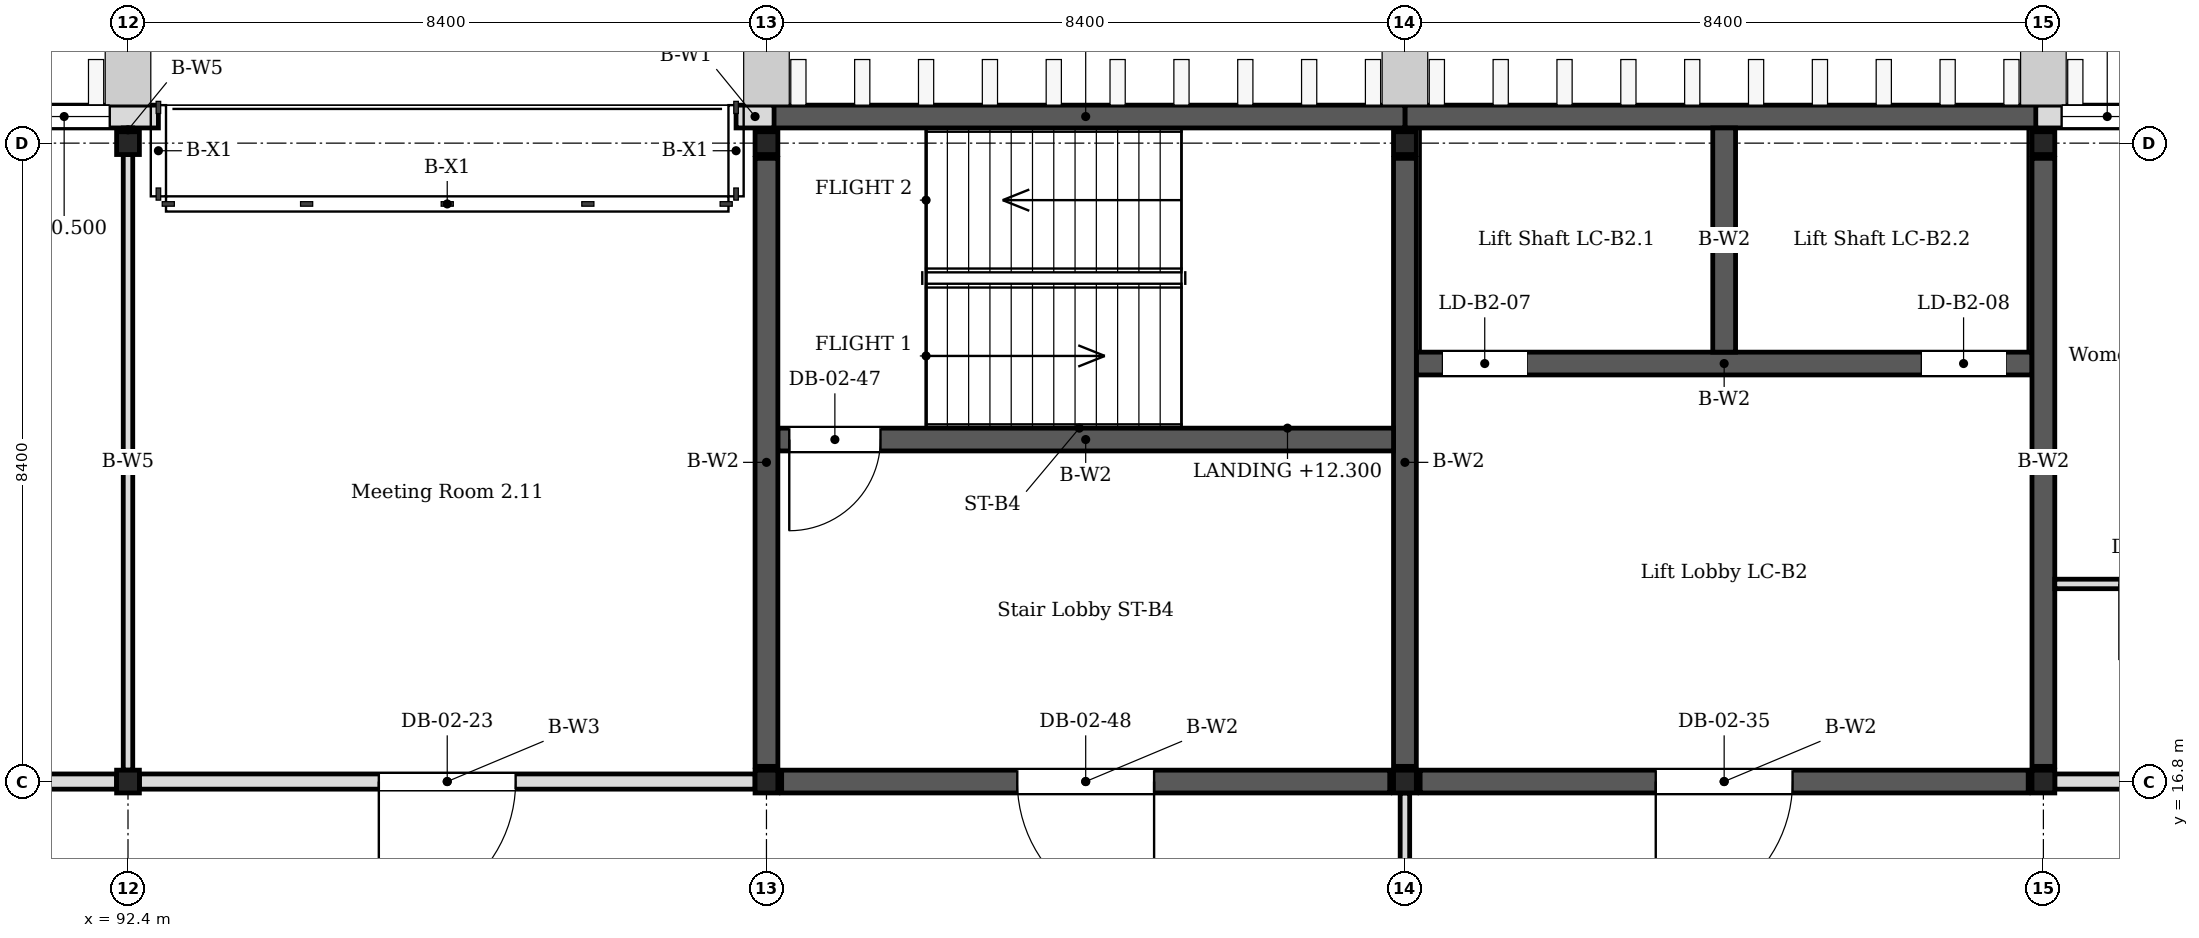
"""IFC4 building model, lengths in metres.
Left out: names, types, materials, properties, quantities, classifications, styles, units other than length and angle.
Written with IfcOpenShell. Run it as: python <this file> out.ifc"""

import sys

from ifc_helpers import new_model, si_unit, direction, frame, frame_2d, origin, origin_2d, place, context, subcontext, project, spatial, rectangle, i_section, extrude, element, fill, save


model = new_model("IFC4")
c1 = context("Model", 3, precision=1e-05, world=origin(), true_north=direction((0.0, 1.0)))
c2 = subcontext(c1, "Body", "Model", "MODEL_VIEW")
j1 = project(units=[si_unit("LENGTHUNIT", "METRE"), si_unit("PLANEANGLEUNIT", "RADIAN")], contexts=[c1])
p1 = place(None, origin())
s1 = spatial("IfcSite", under=j1, at=p1, CompositionType="ELEMENT")
p2 = place(p1, origin())
s2 = spatial("IfcBuilding", under=s1, at=p2, CompositionType="ELEMENT")
p3 = place(p2, frame((0.0, 0.0, 10.2)))
s3 = spatial("IfcBuildingStorey", under=s2, at=p3, CompositionType="ELEMENT", Elevation=10.2)
for number, where, z_axis, x_axis in (
    (1, (92.4, 16.8, 0.0), (0.0, 0.0, 1.0), (1.0, 0.0, 0.0)),
    (2, (92.4, 25.2, 0.0), (0.0, 0.0, 1.0), (1.0, 0.0, 0.0)),
    (3, (100.8, 16.8, 0.0), (0.0, 0.0, 1.0), (1.0, 0.0, 0.0)),
    (4, (100.8, 25.2, 0.0), (0.0, 0.0, 1.0), (1.0, 0.0, 0.0)),
    (5, (109.2, 16.8, 0.0), (0.0, 0.0, 1.0), (1.0, 0.0, 0.0)),
    (6, (109.2, 25.2, 0.0), (0.0, 0.0, 1.0), (1.0, 0.0, 0.0)),
    (7, (117.6, 16.8, 0.0), (0.0, 0.0, 1.0), (1.0, 0.0, 0.0)),
    (8, (117.6, 25.2, 0.0), (0.0, 0.0, 1.0), (1.0, 0.0, 0.0)),
):
    element("IfcColumn", number, at=place(p3, frame(where, z_axis=z_axis, x_axis=x_axis)), inside=s3, PredefinedType="COLUMN", context=c2, shape_type="SweptSolid", body=[
        extrude(i_section(OverallWidth=0.3, OverallDepth=0.3, WebThickness=0.01, FlangeThickness=0.015, FilletRadius=0.013, at=origin_2d()), origin(), (0.0, 0.0, 1.0), 4.2),
    ])
for number, where, z_axis, x_axis in (
    (9, (109.2, 17.0, 0.0), (0.0, 0.0, 1.0), (0.0, 1.0, 0.0)),
    (10, (117.6, 17.0, 0.0), (0.0, 0.0, 1.0), (0.0, 1.0, 0.0)),
):
    element("IfcWall", number, at=place(p3, frame(where, z_axis=z_axis, x_axis=x_axis)), inside=s3, PredefinedType="SHEAR", context=c2, shape_type="SweptSolid", body=[
        extrude(rectangle(XDim=8.0, YDim=0.3, at=frame_2d((4.0, 0.0))), origin(), (0.0, 0.0, 1.0), 4.05),
    ])
p4 = place(p3, frame((109.4, 16.8, 0.0), z_axis=(0.0, 0.0, 1.0), x_axis=(1.0, 0.0, 0.0)))
e11 = element("IfcWall", 11, at=p4, inside=s3, PredefinedType="SHEAR", context=c2, shape_type="SweptSolid", body=[
    extrude(rectangle(XDim=8.0, YDim=0.3, at=frame_2d((4.0, 0.0))), origin(), (0.0, 0.0, 1.0), 4.05),
])
p5 = place(p4, frame((3.1, 0.0, 0.0)))
e12 = element("IfcOpeningElement", 12, at=p5, cuts=e11, PredefinedType="OPENING", context=c2, shape_type="SweptSolid", body=[
    extrude(rectangle(XDim=1.8, YDim=2.1, at=frame_2d((0.9, 1.05))), frame((0.0, 0.16, 0.0), z_axis=(0.0, -1.0, 0.0), x_axis=(1.0, 0.0, 0.0)), (0.0, 0.0, 1.0), 0.32),
])
p6 = place(p3, frame((109.35, 22.3, 0.0), z_axis=(0.0, 0.0, 1.0), x_axis=(1.0, 0.0, 0.0)))
e13 = element("IfcWall", 13, at=p6, inside=s3, PredefinedType="SHEAR", context=c2, shape_type="SweptSolid", body=[
    extrude(rectangle(XDim=8.1, YDim=0.3, at=frame_2d((4.05, 0.0))), origin(), (0.0, 0.0, 1.0), 4.05),
])
p7 = place(p6, frame((0.35, 0.0, 0.0)))
e14 = element("IfcOpeningElement", 14, at=p7, cuts=e13, PredefinedType="OPENING", context=c2, shape_type="SweptSolid", body=[
    extrude(rectangle(XDim=1.1, YDim=2.2, at=frame_2d((0.55, 1.1))), frame((0.0, 0.16, 0.0), z_axis=(0.0, -1.0, 0.0), x_axis=(1.0, 0.0, 0.0)), (0.0, 0.0, 1.0), 0.32),
])
p8 = place(p6, frame((6.65, 0.0, 0.0)))
e15 = element("IfcOpeningElement", 15, at=p8, cuts=e13, PredefinedType="OPENING", context=c2, shape_type="SweptSolid", body=[
    extrude(rectangle(XDim=1.1, YDim=2.2, at=frame_2d((0.55, 1.1))), frame((0.0, 0.16, 0.0), z_axis=(0.0, -1.0, 0.0), x_axis=(1.0, 0.0, 0.0)), (0.0, 0.0, 1.0), 0.32),
])
p9 = place(p3, frame((109.2, 25.55, 0.0), z_axis=(0.0, 0.0, 1.0), x_axis=(1.0, 0.0, 0.0)))
e16 = element("IfcWall", 16, at=p9, inside=s3, PredefinedType="SHEAR", context=c2, shape_type="SweptSolid", body=[
    extrude(rectangle(XDim=8.4, YDim=0.3, at=frame_2d((4.2, 0.0))), origin(), (0.0, 0.0, 1.0), 4.05),
])
p10 = place(p3, frame((113.4, 22.45, 0.0), z_axis=(0.0, 0.0, 1.0), x_axis=(0.0, 1.0, 0.0)))
e17 = element("IfcWall", 17, at=p10, inside=s3, PredefinedType="SHEAR", context=c2, shape_type="SweptSolid", body=[
    extrude(rectangle(XDim=2.95, YDim=0.3, at=frame_2d((1.475, 0.0))), origin(), (0.0, 0.0, 1.0), 4.05),
])
p11 = place(p3, frame((100.8, 17.0, 0.0), z_axis=(0.0, 0.0, 1.0), x_axis=(0.0, 1.0, 0.0)))
e18 = element("IfcWall", 18, at=p11, inside=s3, PredefinedType="SHEAR", context=c2, shape_type="SweptSolid", body=[
    extrude(rectangle(XDim=8.0, YDim=0.3, at=frame_2d((4.0, 0.0))), origin(), (0.0, 0.0, 1.0), 4.05),
])
p12 = place(p3, frame((101.0, 16.8, 0.0), z_axis=(0.0, 0.0, 1.0), x_axis=(1.0, 0.0, 0.0)))
e19 = element("IfcWall", 19, at=p12, inside=s3, PredefinedType="SHEAR", context=c2, shape_type="SweptSolid", body=[
    extrude(rectangle(XDim=8.0, YDim=0.3, at=frame_2d((4.0, 0.0))), origin(), (0.0, 0.0, 1.0), 4.05),
])
p13 = place(p12, frame((3.1, 0.0, 0.0)))
e20 = element("IfcOpeningElement", 20, at=p13, cuts=e19, PredefinedType="OPENING", context=c2, shape_type="SweptSolid", body=[
    extrude(rectangle(XDim=1.8, YDim=2.1, at=frame_2d((0.9, 1.05))), frame((0.0, 0.16, 0.0), z_axis=(0.0, -1.0, 0.0), x_axis=(1.0, 0.0, 0.0)), (0.0, 0.0, 1.0), 0.32),
])
p14 = place(p3, frame((100.95, 21.3, 0.0), z_axis=(0.0, 0.0, 1.0), x_axis=(1.0, 0.0, 0.0)))
e21 = element("IfcWall", 21, at=p14, inside=s3, PredefinedType="SHEAR", context=c2, shape_type="SweptSolid", body=[
    extrude(rectangle(XDim=8.1, YDim=0.3, at=frame_2d((4.05, 0.0))), origin(), (0.0, 0.0, 1.0), 4.05),
])
p15 = place(p14, frame((0.15, 0.0, 0.0)))
e22 = element("IfcOpeningElement", 22, at=p15, cuts=e21, PredefinedType="OPENING", context=c2, shape_type="SweptSolid", body=[
    extrude(rectangle(XDim=1.2, YDim=2.1, at=frame_2d((0.6, 1.05))), frame((0.0, 0.16, 0.0), z_axis=(0.0, -1.0, 0.0), x_axis=(1.0, 0.0, 0.0)), (0.0, 0.0, 1.0), 0.32),
])
p16 = place(p3, frame((100.8, 25.55, 0.0), z_axis=(0.0, 0.0, 1.0), x_axis=(1.0, 0.0, 0.0)))
e23 = element("IfcWall", 23, at=p16, inside=s3, PredefinedType="SHEAR", context=c2, shape_type="SweptSolid", body=[
    extrude(rectangle(XDim=8.4, YDim=0.3, at=frame_2d((4.2, 0.0))), origin(), (0.0, 0.0, 1.0), 4.05),
])
p17 = place(p3, frame((83.6, 25.55, 0.0), z_axis=(0.0, 0.0, 1.0), x_axis=(1.0, 0.0, 0.0)))
e24 = element("IfcWall", 24, at=p17, inside=s3, PredefinedType="SOLIDWALL", context=c2, shape_type="SweptSolid", body=[
    extrude(rectangle(XDim=9.2, YDim=0.3, at=frame_2d((4.6, 0.0))), origin(), (0.0, 0.0, 1.0), 4.05),
])
p18 = place(p17, frame((0.64, 0.0, 0.3)))
e25 = element("IfcOpeningElement", 25, at=p18, cuts=e24, PredefinedType="OPENING", context=c2, shape_type="SweptSolid", body=[
    extrude(rectangle(XDim=1.2, YDim=3.3, at=frame_2d((0.6, 1.65))), frame((0.0, 0.16, 0.0), z_axis=(0.0, -1.0, 0.0), x_axis=(1.0, 0.0, 0.0)), (0.0, 0.0, 1.0), 0.32),
])
p19 = place(p17, frame((2.32, 0.0, 0.3)))
e26 = element("IfcOpeningElement", 26, at=p19, cuts=e24, PredefinedType="OPENING", context=c2, shape_type="SweptSolid", body=[
    extrude(rectangle(XDim=1.2, YDim=3.3, at=frame_2d((0.6, 1.65))), frame((0.0, 0.16, 0.0), z_axis=(0.0, -1.0, 0.0), x_axis=(1.0, 0.0, 0.0)), (0.0, 0.0, 1.0), 0.32),
])
p20 = place(p17, frame((4.0, 0.0, 0.3)))
e27 = element("IfcOpeningElement", 27, at=p20, cuts=e24, PredefinedType="OPENING", context=c2, shape_type="SweptSolid", body=[
    extrude(rectangle(XDim=1.2, YDim=3.3, at=frame_2d((0.6, 1.65))), frame((0.0, 0.16, 0.0), z_axis=(0.0, -1.0, 0.0), x_axis=(1.0, 0.0, 0.0)), (0.0, 0.0, 1.0), 0.32),
])
p21 = place(p17, frame((5.68, 0.0, 0.3)))
e28 = element("IfcOpeningElement", 28, at=p21, cuts=e24, PredefinedType="OPENING", context=c2, shape_type="SweptSolid", body=[
    extrude(rectangle(XDim=1.2, YDim=3.3, at=frame_2d((0.6, 1.65))), frame((0.0, 0.16, 0.0), z_axis=(0.0, -1.0, 0.0), x_axis=(1.0, 0.0, 0.0)), (0.0, 0.0, 1.0), 0.32),
])
p22 = place(p17, frame((7.36, 0.0, 0.3)))
e29 = element("IfcOpeningElement", 29, at=p22, cuts=e24, PredefinedType="OPENING", context=c2, shape_type="SweptSolid", body=[
    extrude(rectangle(XDim=1.2, YDim=3.3, at=frame_2d((0.6, 1.65))), frame((0.0, 0.16, 0.0), z_axis=(0.0, -1.0, 0.0), x_axis=(1.0, 0.0, 0.0)), (0.0, 0.0, 1.0), 0.32),
])
p23 = place(p3, frame((100.4, 25.55, 0.0), z_axis=(0.0, 0.0, 1.0), x_axis=(1.0, 0.0, 0.0)))
e30 = element("IfcWall", 30, at=p23, inside=s3, PredefinedType="SOLIDWALL", context=c2, shape_type="SweptSolid", body=[
    extrude(rectangle(XDim=0.5, YDim=0.3, at=frame_2d((0.25, 0.0))), origin(), (0.0, 0.0, 1.0), 4.05),
])
p24 = place(p3, frame((117.5, 25.55, 0.0), z_axis=(0.0, 0.0, 1.0), x_axis=(1.0, 0.0, 0.0)))
e31 = element("IfcWall", 31, at=p24, inside=s3, PredefinedType="SOLIDWALL", context=c2, shape_type="SweptSolid", body=[
    extrude(rectangle(XDim=8.9, YDim=0.3, at=frame_2d((4.45, 0.0))), origin(), (0.0, 0.0, 1.0), 4.05),
])
p25 = place(p24, frame((0.34, 0.0, 1.5)))
e32 = element("IfcOpeningElement", 32, at=p25, cuts=e31, PredefinedType="OPENING", context=c2, shape_type="SweptSolid", body=[
    extrude(rectangle(XDim=1.2, YDim=1.2, at=frame_2d((0.6, 0.6))), frame((0.0, 0.16, 0.0), z_axis=(0.0, -1.0, 0.0), x_axis=(1.0, 0.0, 0.0)), (0.0, 0.0, 1.0), 0.32),
])
p26 = place(p24, frame((3.7, 0.0, 1.5)))
e33 = element("IfcOpeningElement", 33, at=p26, cuts=e31, PredefinedType="OPENING", context=c2, shape_type="SweptSolid", body=[
    extrude(rectangle(XDim=1.2, YDim=1.2, at=frame_2d((0.6, 0.6))), frame((0.0, 0.16, 0.0), z_axis=(0.0, -1.0, 0.0), x_axis=(1.0, 0.0, 0.0)), (0.0, 0.0, 1.0), 0.32),
])
p27 = place(p24, frame((7.06, 0.0, 1.5)))
e34 = element("IfcOpeningElement", 34, at=p27, cuts=e31, PredefinedType="OPENING", context=c2, shape_type="SweptSolid", body=[
    extrude(rectangle(XDim=1.2, YDim=1.2, at=frame_2d((0.6, 0.6))), frame((0.0, 0.16, 0.0), z_axis=(0.0, -1.0, 0.0), x_axis=(1.0, 0.0, 0.0)), (0.0, 0.0, 1.0), 0.32),
])
p28 = place(p3, frame((84.15, 16.8, 0.0), z_axis=(0.0, 0.0, 1.0), x_axis=(1.0, 0.0, 0.0)))
e35 = element("IfcWall", 35, at=p28, inside=s3, PredefinedType="PARTITIONING", context=c2, shape_type="SweptSolid", body=[
    extrude(rectangle(XDim=8.1, YDim=0.2, at=frame_2d((4.05, 0.0))), origin(), (0.0, 0.0, 1.0), 3.35),
])
p29 = place(p28, frame((2.85, 0.0, 0.0)))
e36 = element("IfcOpeningElement", 36, at=p29, cuts=e35, PredefinedType="OPENING", context=c2, shape_type="SweptSolid", body=[
    extrude(rectangle(XDim=2.4, YDim=2.2, at=frame_2d((1.2, 1.1))), frame((0.0, 0.11, 0.0), z_axis=(0.0, -1.0, 0.0), x_axis=(1.0, 0.0, 0.0)), (0.0, 0.0, 1.0), 0.22),
])
p30 = place(p3, frame((92.55, 16.8, 0.0), z_axis=(0.0, 0.0, 1.0), x_axis=(1.0, 0.0, 0.0)))
e37 = element("IfcWall", 37, at=p30, inside=s3, PredefinedType="PARTITIONING", context=c2, shape_type="SweptSolid", body=[
    extrude(rectangle(XDim=8.1, YDim=0.2, at=frame_2d((4.05, 0.0))), origin(), (0.0, 0.0, 1.0), 3.35),
])
p31 = place(p30, frame((3.15, 0.0, 0.0)))
e38 = element("IfcOpeningElement", 38, at=p31, cuts=e37, PredefinedType="OPENING", context=c2, shape_type="SweptSolid", body=[
    extrude(rectangle(XDim=1.8, YDim=2.1, at=frame_2d((0.9, 1.05))), frame((0.0, 0.11, 0.0), z_axis=(0.0, -1.0, 0.0), x_axis=(1.0, 0.0, 0.0)), (0.0, 0.0, 1.0), 0.22),
])
p32 = place(p3, frame((117.75, 16.8, 0.0), z_axis=(0.0, 0.0, 1.0), x_axis=(1.0, 0.0, 0.0)))
e39 = element("IfcWall", 39, at=p32, inside=s3, PredefinedType="PARTITIONING", context=c2, shape_type="SweptSolid", body=[
    extrude(rectangle(XDim=8.1, YDim=0.2, at=frame_2d((4.05, 0.0))), origin(), (0.0, 0.0, 1.0), 3.35),
])
p33 = place(p32, frame((3.15, 0.0, 0.0)))
e40 = element("IfcOpeningElement", 40, at=p33, cuts=e39, PredefinedType="OPENING", context=c2, shape_type="SweptSolid", body=[
    extrude(rectangle(XDim=1.8, YDim=2.1, at=frame_2d((0.9, 1.05))), frame((0.0, 0.11, 0.0), z_axis=(0.0, -1.0, 0.0), x_axis=(1.0, 0.0, 0.0)), (0.0, 0.0, 1.0), 0.22),
])
p34 = place(p3, frame((117.75, 19.4, 0.0), z_axis=(0.0, 0.0, 1.0), x_axis=(1.0, 0.0, 0.0)))
e41 = element("IfcWall", 41, at=p34, inside=s3, PredefinedType="PARTITIONING", context=c2, shape_type="SweptSolid", body=[
    extrude(rectangle(XDim=8.175, YDim=0.125, at=frame_2d((4.087, 0.0))), origin(), (0.0, 0.0, 1.0), 3.35),
])
p35 = place(p34, frame((0.85, 0.0, 0.0)))
e42 = element("IfcOpeningElement", 42, at=p35, cuts=e41, PredefinedType="OPENING", context=c2, shape_type="SweptSolid", body=[
    extrude(rectangle(XDim=1.0, YDim=2.1, at=frame_2d((0.5, 1.05))), frame((0.0, 0.073, 0.0), z_axis=(0.0, -1.0, 0.0), x_axis=(1.0, 0.0, 0.0)), (0.0, 0.0, 1.0), 0.145),
])
p36 = place(p34, frame((3.85, 0.0, 0.0)))
e43 = element("IfcOpeningElement", 43, at=p36, cuts=e41, PredefinedType="OPENING", context=c2, shape_type="SweptSolid", body=[
    extrude(rectangle(XDim=1.0, YDim=2.1, at=frame_2d((0.5, 1.05))), frame((0.0, 0.073, 0.0), z_axis=(0.0, -1.0, 0.0), x_axis=(1.0, 0.0, 0.0)), (0.0, 0.0, 1.0), 0.145),
])
p37 = place(p34, frame((6.55, 0.0, 0.0)))
e44 = element("IfcOpeningElement", 44, at=p37, cuts=e41, PredefinedType="OPENING", context=c2, shape_type="SweptSolid", body=[
    extrude(rectangle(XDim=1.0, YDim=2.1, at=frame_2d((0.5, 1.05))), frame((0.0, 0.073, 0.0), z_axis=(0.0, -1.0, 0.0), x_axis=(1.0, 0.0, 0.0)), (0.0, 0.0, 1.0), 0.145),
])
p38 = place(p3, frame((92.4, 16.95, 0.0), z_axis=(0.0, 0.0, 1.0), x_axis=(0.0, 1.0, 0.0)))
e45 = element("IfcWall", 45, at=p38, inside=s3, PredefinedType="MOVABLE", context=c2, shape_type="SweptSolid", body=[
    extrude(rectangle(XDim=8.1, YDim=0.125, at=frame_2d((4.05, 0.0))), origin(), (0.0, 0.0, 1.0), 3.35),
])
p39 = place(p3, frame((92.4, 25.35, 0.0), z_axis=(0.0, 0.0, 1.0), x_axis=(0.0, 1.0, 0.0)))
e46 = element("IfcWall", 46, at=p39, inside=s3, PredefinedType="MOVABLE", context=c2, shape_type="SweptSolid", body=[
    extrude(rectangle(XDim=0.05, YDim=0.125, at=frame_2d((0.025, 0.0))), origin(), (0.0, 0.0, 1.0), 3.35),
])
p40 = place(p3, frame((109.2, 8.55, 0.0), z_axis=(0.0, 0.0, 1.0), x_axis=(0.0, 1.0, 0.0)))
e47 = element("IfcWall", 47, at=p40, inside=s3, PredefinedType="PARTITIONING", context=c2, shape_type="SweptSolid", body=[
    extrude(rectangle(XDim=8.1, YDim=0.125, at=frame_2d((4.05, 0.0))), origin(), (0.0, 0.0, 1.0), 3.35),
])
p41 = place(p40, frame((2.85, 0.0, 0.0)))
e48 = element("IfcOpeningElement", 48, at=p41, cuts=e47, PredefinedType="OPENING", context=c2, shape_type="SweptSolid", body=[
    extrude(rectangle(XDim=2.4, YDim=2.2, at=frame_2d((1.2, 1.1))), frame((0.0, 0.073, 0.0), z_axis=(0.0, -1.0, 0.0), x_axis=(1.0, 0.0, 0.0)), (0.0, 0.0, 1.0), 0.145),
])
p42 = place(p22, origin())
e49 = element("IfcWindow", 49, at=p42, inside=s3, PartitioningType="TRIPLE_PANEL_VERTICAL", PredefinedType="WINDOW", context=c2, shape_type="SweptSolid", body=[
    extrude(rectangle(XDim=1.2, YDim=3.3, at=frame_2d((0.6, 1.65))), frame((0.0, 0.03, 0.0), z_axis=(0.0, -1.0, 0.0), x_axis=(1.0, 0.0, 0.0)), (0.0, 0.0, 1.0), 0.06),
])
fill(e29, e49)
p43 = place(p25, origin())
e50 = element("IfcWindow", 50, at=p43, inside=s3, PartitioningType="SINGLE_PANEL", PredefinedType="WINDOW", context=c2, shape_type="SweptSolid", body=[
    extrude(rectangle(XDim=1.2, YDim=1.2, at=frame_2d((0.6, 0.6))), frame((0.0, 0.03, 0.0), z_axis=(0.0, -1.0, 0.0), x_axis=(1.0, 0.0, 0.0)), (0.0, 0.0, 1.0), 0.06),
])
fill(e32, e50)
p44 = place(p31, origin())
e51 = element("IfcDoor", 51, at=p44, inside=s3, OperationType="DOUBLE_DOOR_SINGLE_SWING", PredefinedType="DOOR", context=c2, shape_type="SweptSolid", body=[
    extrude(rectangle(XDim=1.8, YDim=2.1, at=frame_2d((0.9, 1.05))), frame((0.0, 0.025, 0.0), z_axis=(0.0, -1.0, 0.0), x_axis=(1.0, 0.0, 0.0)), (0.0, 0.0, 1.0), 0.05),
])
fill(e38, e51)
p45 = place(p5, origin())
e52 = element("IfcDoor", 52, at=p45, inside=s3, OperationType="DOUBLE_DOOR_SINGLE_SWING", PredefinedType="DOOR", context=c2, shape_type="SweptSolid", body=[
    extrude(rectangle(XDim=1.8, YDim=2.1, at=frame_2d((0.9, 1.05))), frame((0.0, 0.025, 0.0), z_axis=(0.0, -1.0, 0.0), x_axis=(1.0, 0.0, 0.0)), (0.0, 0.0, 1.0), 0.05),
])
fill(e12, e52)
p46 = place(p7, origin())
e53 = element("IfcDoor", 53, at=p46, inside=s3, OperationType="SLIDING_TO_LEFT", PredefinedType="DOOR", context=c2, shape_type="SweptSolid", body=[
    extrude(rectangle(XDim=1.1, YDim=2.2, at=frame_2d((0.55, 1.1))), frame((0.0, 0.025, 0.0), z_axis=(0.0, -1.0, 0.0), x_axis=(1.0, 0.0, 0.0)), (0.0, 0.0, 1.0), 0.05),
])
fill(e14, e53)
p47 = place(p8, origin())
e54 = element("IfcDoor", 54, at=p47, inside=s3, OperationType="SLIDING_TO_LEFT", PredefinedType="DOOR", context=c2, shape_type="SweptSolid", body=[
    extrude(rectangle(XDim=1.1, YDim=2.2, at=frame_2d((0.55, 1.1))), frame((0.0, 0.025, 0.0), z_axis=(0.0, -1.0, 0.0), x_axis=(1.0, 0.0, 0.0)), (0.0, 0.0, 1.0), 0.05),
])
fill(e15, e54)
p48 = place(p15, origin())
e55 = element("IfcDoor", 55, at=p48, inside=s3, OperationType="SINGLE_SWING_LEFT", PredefinedType="DOOR", context=c2, shape_type="SweptSolid", body=[
    extrude(rectangle(XDim=1.2, YDim=2.1, at=frame_2d((0.6, 1.05))), frame((0.0, 0.025, 0.0), z_axis=(0.0, -1.0, 0.0), x_axis=(1.0, 0.0, 0.0)), (0.0, 0.0, 1.0), 0.05),
])
fill(e22, e55)
p49 = place(p13, origin())
e56 = element("IfcDoor", 56, at=p49, inside=s3, OperationType="DOUBLE_DOOR_SINGLE_SWING", PredefinedType="DOOR", context=c2, shape_type="SweptSolid", body=[
    extrude(rectangle(XDim=1.8, YDim=2.1, at=frame_2d((0.9, 1.05))), frame((0.0, 0.025, 0.0), z_axis=(0.0, -1.0, 0.0), x_axis=(1.0, 0.0, 0.0)), (0.0, 0.0, 1.0), 0.05),
])
fill(e20, e56)
save(model, sys.argv[1])
